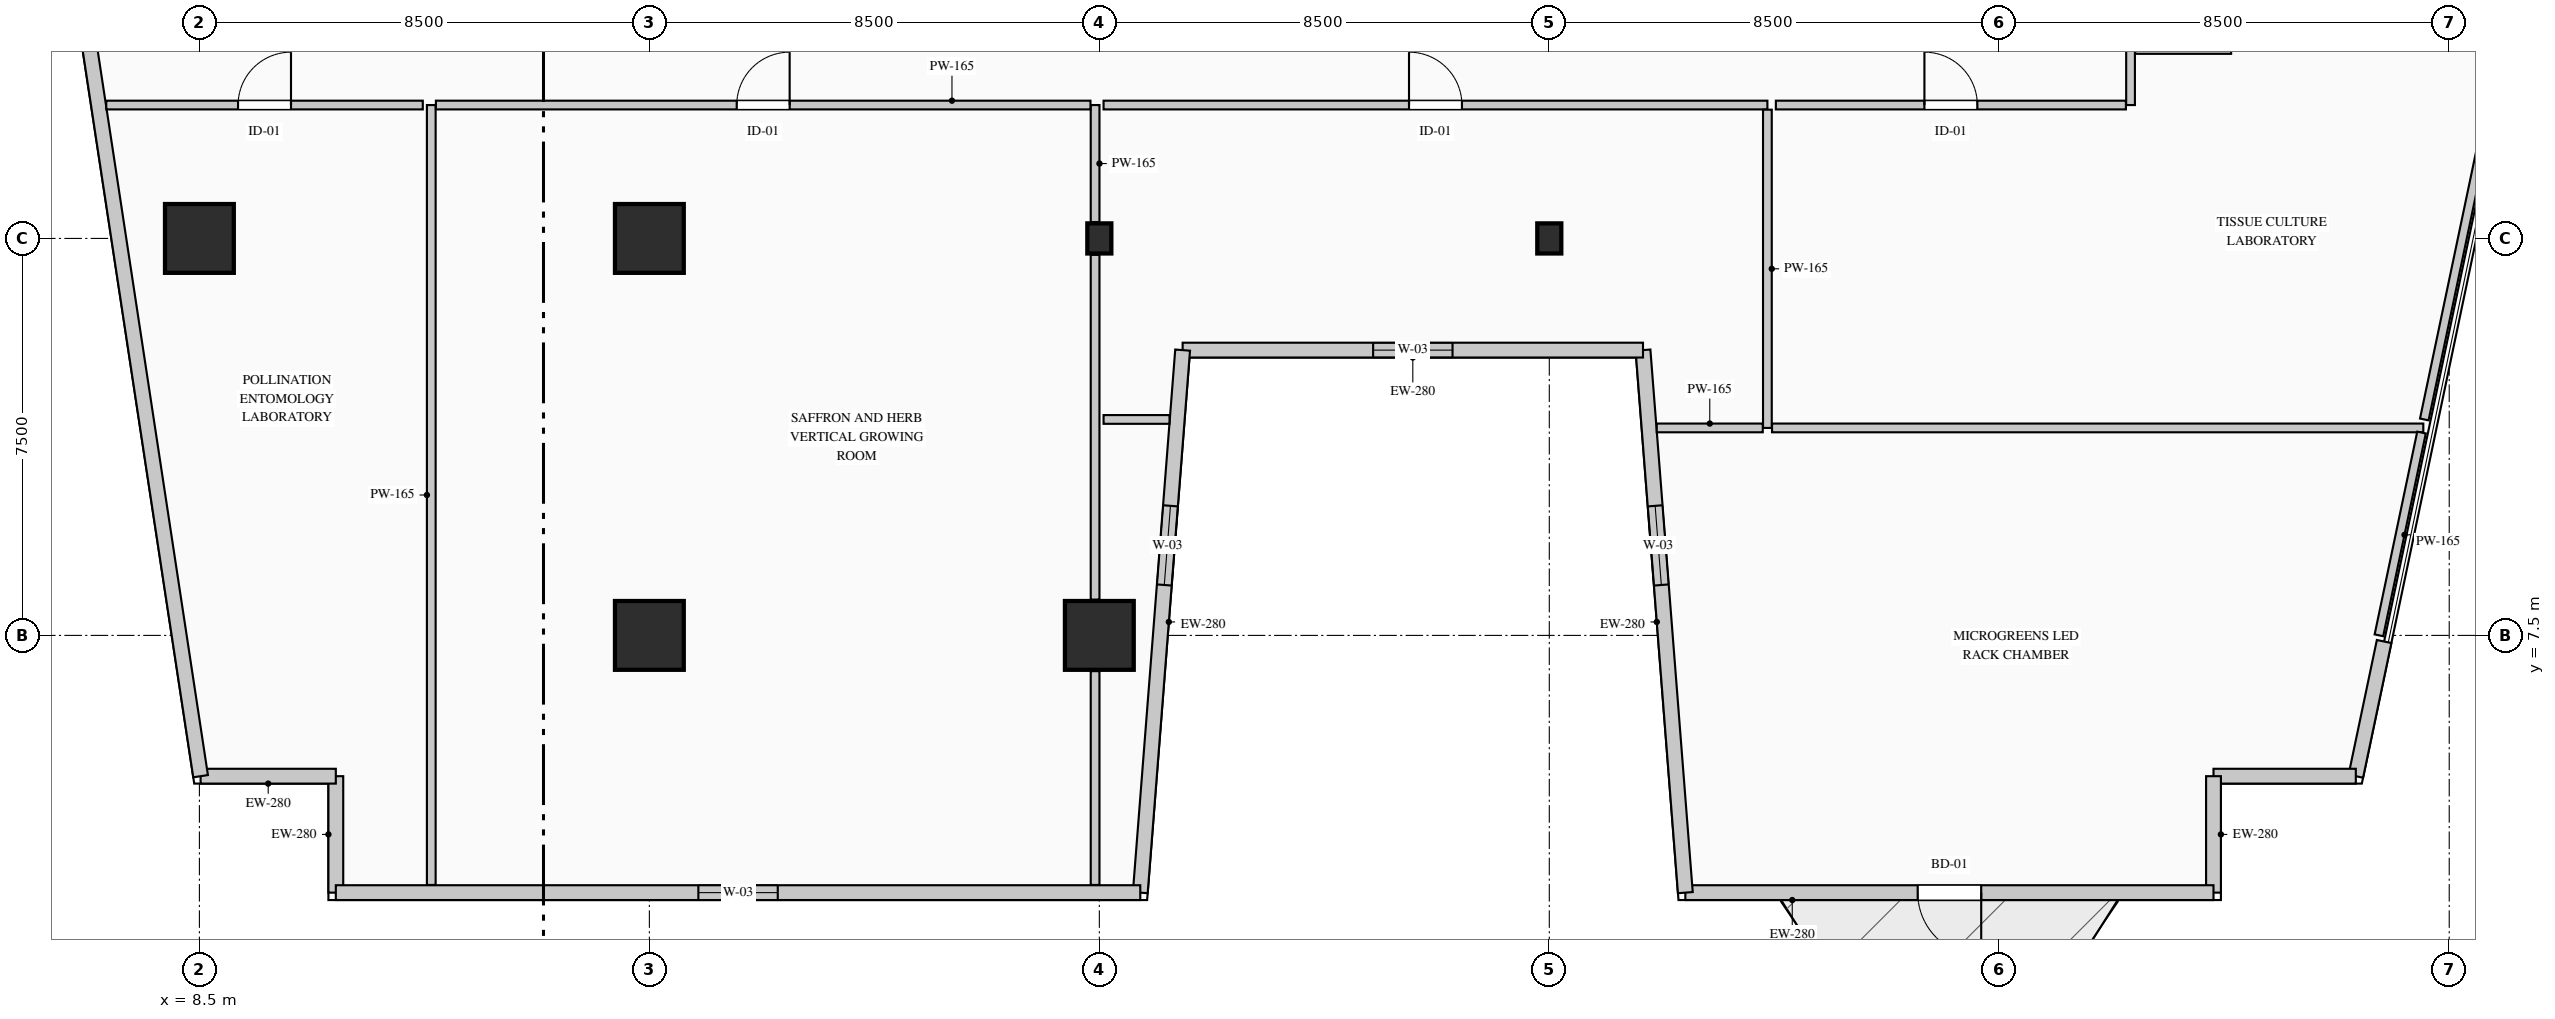
"""IFC4 building model, lengths in metres.
Left out: names, types, materials, properties, quantities, classifications, styles, units other than length and angle.
Written with IfcOpenShell. Run it as: python <this file> out.ifc"""

import sys

from ifc_helpers import new_model, si_unit, direction, frame, frame_2d, origin, origin_2d, place, context, subcontext, project, spatial, rectangle, i_section, extrude, element, fill, save


model = new_model("IFC4")
c1 = context("Model", 3, precision=1e-05, world=origin(), true_north=direction((0.0, 1.0)))
c2 = subcontext(c1, "Body", "Model", "MODEL_VIEW")
j1 = project(units=[si_unit("LENGTHUNIT", "METRE"), si_unit("PLANEANGLEUNIT", "RADIAN")], contexts=[c1])
p1 = place(None, origin())
s1 = spatial("IfcSite", under=j1, at=p1, CompositionType="ELEMENT")
p2 = place(p1, origin())
s2 = spatial("IfcBuilding", under=s1, at=p2, CompositionType="ELEMENT")
p3 = place(p2, frame((0.0, 0.0, 44.6)))
s3 = spatial("IfcBuildingStorey", under=s2, at=p3, CompositionType="ELEMENT", Elevation=44.6)
for number, where, z_axis, x_axis in (
    (1, (8.5, 15.0, 0.0), (0.0, 0.0, 1.0), (1.0, 0.0, 0.0)),
    (2, (17.0, 7.5, 0.0), (0.0, 0.0, 1.0), (1.0, 0.0, 0.0)),
    (3, (17.0, 15.0, 0.0), (0.0, 0.0, 1.0), (1.0, 0.0, 0.0)),
    (4, (25.5, 7.5, 0.0), (0.0, 0.0, 1.0), (1.0, 0.0, 0.0)),
):
    element("IfcColumn", number, at=place(p3, frame(where, z_axis=z_axis, x_axis=x_axis)), inside=s3, PredefinedType="COLUMN", context=c2, shape_type="SweptSolid", body=[
        extrude(rectangle(XDim=1.3, YDim=1.3, at=origin_2d()), origin(), (0.0, 0.0, 1.0), 4.4),
    ])
for number, where, z_axis, x_axis in (
    (5, (25.5, 15.0, 0.0), (0.0, 0.0, 1.0), (1.0, 0.0, 0.0)),
    (6, (34.0, 15.0, 0.0), (0.0, 0.0, 1.0), (1.0, 0.0, 0.0)),
):
    element("IfcColumn", number, at=place(p3, frame(where, z_axis=z_axis, x_axis=x_axis)), inside=s3, PredefinedType="COLUMN", context=c2, shape_type="SweptSolid", body=[
        extrude(i_section(OverallWidth=0.454, OverallDepth=0.569, WebThickness=0.078, FlangeThickness=0.08, FilletRadius=0.015, at=origin_2d()), origin(), (0.0, 0.0, 1.0), 4.4),
    ])
p4 = place(p3, frame((11.077, 2.64, 0.0), z_axis=(0.0, 0.0, 1.0), x_axis=(0.0, 1.0, 0.0)))
e7 = element("IfcWall", 7, at=p4, inside=s3, PredefinedType="STANDARD", context=c2, shape_type="SweptSolid", body=[
    extrude(rectangle(XDim=2.2, YDim=0.28, at=frame_2d((1.1, 0.0))), origin(), (0.0, 0.0, 1.0), 4.1),
])
p5 = place(p3, frame((11.077, 4.84, 0.0), z_axis=(0.0, 0.0, 1.0), x_axis=(-1.0, 0.0, 0.0)))
e8 = element("IfcWall", 8, at=p5, inside=s3, PredefinedType="STANDARD", context=c2, shape_type="SweptSolid", body=[
    extrude(rectangle(XDim=2.554, YDim=0.28, at=frame_2d((1.277, 0.0))), origin(), (0.0, 0.0, 1.0), 4.1),
])
p6 = place(p3, frame((8.523, 4.84, 0.0), z_axis=(0.0, 0.0, 1.0), x_axis=(-0.150394554312, 0.988626055712, 0.0)))
e9 = element("IfcWall", 9, at=p6, inside=s3, PredefinedType="STANDARD", context=c2, shape_type="SweptSolid", body=[
    extrude(rectangle(XDim=36.738, YDim=0.28, at=frame_2d((18.369, 0.0))), origin(), (0.0, 0.0, 1.0), 4.1),
])
p7 = place(p6, frame((22.762, 0.0, 0.9)))
e10 = element("IfcOpeningElement", 10, at=p7, cuts=e9, PredefinedType="OPENING", context=c2, shape_type="SweptSolid", body=[
    extrude(rectangle(XDim=1.5, YDim=1.8, at=frame_2d((0.75, 0.9))), frame((0.0, 0.15, 0.0), z_axis=(0.0, -1.0, 0.0), x_axis=(1.0, 0.0, 0.0)), (0.0, 0.0, 1.0), 0.3),
])
p8 = place(p3, frame((49.77, 7.385, 0.0), z_axis=(0.0, 0.0, 1.0), x_axis=(-0.205551409765, -0.978646319128, 0.0)))
e11 = element("IfcWall", 11, at=p8, inside=s3, PredefinedType="STANDARD", context=c2, shape_type="SweptSolid", body=[
    extrude(rectangle(XDim=2.6, YDim=0.28, at=frame_2d((1.3, 0.0))), origin(), (0.0, 0.0, 1.0), 4.1),
])
p9 = place(p3, frame((49.236, 4.84, 0.0), z_axis=(0.0, 0.0, 1.0), x_axis=(-1.0, 0.0, 0.0)))
e12 = element("IfcWall", 12, at=p9, inside=s3, PredefinedType="STANDARD", context=c2, shape_type="SweptSolid", body=[
    extrude(rectangle(XDim=2.688, YDim=0.28, at=frame_2d((1.344, 0.0))), origin(), (0.0, 0.0, 1.0), 4.1),
])
p10 = place(p3, frame((46.547, 4.84, 0.0), z_axis=(0.0, 0.0, 1.0), x_axis=(0.0, -1.0, 0.0)))
e13 = element("IfcWall", 13, at=p10, inside=s3, PredefinedType="STANDARD", context=c2, shape_type="SweptSolid", body=[
    extrude(rectangle(XDim=2.2, YDim=0.28, at=frame_2d((1.1, 0.0))), origin(), (0.0, 0.0, 1.0), 4.1),
])
p11 = place(p3, frame((46.547, 2.64, 0.0), z_axis=(0.0, 0.0, 1.0), x_axis=(-1.0, 0.0, 0.0)))
e14 = element("IfcWall", 14, at=p11, inside=s3, PredefinedType="STANDARD", context=c2, shape_type="SweptSolid", body=[
    extrude(rectangle(XDim=9.977, YDim=0.28, at=frame_2d((4.989, 0.0))), origin(), (0.0, 0.0, 1.0), 4.1),
])
p12 = place(p11, frame((4.388, 0.0, 0.0)))
e15 = element("IfcOpeningElement", 15, at=p12, cuts=e14, PredefinedType="OPENING", context=c2, shape_type="SweptSolid", body=[
    extrude(rectangle(XDim=1.2, YDim=2.2, at=frame_2d((0.6, 1.1))), frame((0.0, 0.15, 0.0), z_axis=(0.0, -1.0, 0.0), x_axis=(1.0, 0.0, 0.0)), (0.0, 0.0, 1.0), 0.3),
])
p13 = place(p3, frame((36.57, 2.64, 0.0), z_axis=(0.0, 0.0, 1.0), x_axis=(-0.077816860153, 0.996967670627, 0.0)))
e16 = element("IfcWall", 16, at=p13, inside=s3, PredefinedType="STANDARD", context=c2, shape_type="SweptSolid", body=[
    extrude(rectangle(XDim=10.281, YDim=0.28, at=frame_2d((5.141, 0.0))), origin(), (0.0, 0.0, 1.0), 4.1),
])
p14 = place(p13, frame((5.83, 0.0, 0.9)))
e17 = element("IfcOpeningElement", 17, at=p14, cuts=e16, PredefinedType="OPENING", context=c2, shape_type="SweptSolid", body=[
    extrude(rectangle(XDim=1.5, YDim=1.8, at=frame_2d((0.75, 0.9))), frame((0.0, 0.15, 0.0), z_axis=(0.0, -1.0, 0.0), x_axis=(1.0, 0.0, 0.0)), (0.0, 0.0, 1.0), 0.3),
])
p15 = place(p3, frame((35.77, 12.89, 0.0), z_axis=(0.0, 0.0, 1.0), x_axis=(-1.0, 0.0, 0.0)))
e18 = element("IfcWall", 18, at=p15, inside=s3, PredefinedType="STANDARD", context=c2, shape_type="SweptSolid", body=[
    extrude(rectangle(XDim=8.697, YDim=0.28, at=frame_2d((4.348, 0.0))), origin(), (0.0, 0.0, 1.0), 4.1),
])
p16 = place(p15, frame((3.598, 0.0, 0.9)))
e19 = element("IfcOpeningElement", 19, at=p16, cuts=e18, PredefinedType="OPENING", context=c2, shape_type="SweptSolid", body=[
    extrude(rectangle(XDim=1.5, YDim=1.8, at=frame_2d((0.75, 0.9))), frame((0.0, 0.15, 0.0), z_axis=(0.0, -1.0, 0.0), x_axis=(1.0, 0.0, 0.0)), (0.0, 0.0, 1.0), 0.3),
])
p17 = place(p3, frame((27.073, 12.89, 0.0), z_axis=(0.0, 0.0, 1.0), x_axis=(-0.077816860153, -0.996967670627, 0.0)))
e20 = element("IfcWall", 20, at=p17, inside=s3, PredefinedType="STANDARD", context=c2, shape_type="SweptSolid", body=[
    extrude(rectangle(XDim=10.281, YDim=0.28, at=frame_2d((5.141, 0.0))), origin(), (0.0, 0.0, 1.0), 4.1),
])
p18 = place(p17, frame((2.951, 0.0, 0.9)))
e21 = element("IfcOpeningElement", 21, at=p18, cuts=e20, PredefinedType="OPENING", context=c2, shape_type="SweptSolid", body=[
    extrude(rectangle(XDim=1.5, YDim=1.8, at=frame_2d((0.75, 0.9))), frame((0.0, 0.15, 0.0), z_axis=(0.0, -1.0, 0.0), x_axis=(1.0, 0.0, 0.0)), (0.0, 0.0, 1.0), 0.3),
])
p19 = place(p3, frame((26.273, 2.64, 0.0), z_axis=(0.0, 0.0, 1.0), x_axis=(-1.0, 0.0, 0.0)))
e22 = element("IfcWall", 22, at=p19, inside=s3, PredefinedType="STANDARD", context=c2, shape_type="SweptSolid", body=[
    extrude(rectangle(XDim=15.197, YDim=0.28, at=frame_2d((7.598, 0.0))), origin(), (0.0, 0.0, 1.0), 4.1),
])
p20 = place(p19, frame((6.848, 0.0, 0.9)))
e23 = element("IfcOpeningElement", 23, at=p20, cuts=e22, PredefinedType="OPENING", context=c2, shape_type="SweptSolid", body=[
    extrude(rectangle(XDim=1.5, YDim=1.8, at=frame_2d((0.75, 0.9))), frame((0.0, 0.15, 0.0), z_axis=(0.0, -1.0, 0.0), x_axis=(1.0, 0.0, 0.0)), (0.0, 0.0, 1.0), 0.3),
])
p21 = place(p3, frame((25.42, 17.52, 0.0), z_axis=(0.0, 0.0, 1.0), x_axis=(0.0, -1.0, 0.0)))
e24 = element("IfcWall", 24, at=p21, inside=s3, PredefinedType="PARTITIONING", context=c2, shape_type="SweptSolid", body=[
    extrude(rectangle(XDim=2.21, YDim=0.165, at=frame_2d((1.105, 0.0))), origin(), (0.0, 0.0, 1.0), 3.285),
])
p22 = place(p3, frame((25.42, 14.69, 0.0), z_axis=(0.0, 0.0, 1.0), x_axis=(0.0, -1.0, 0.0)))
e25 = element("IfcWall", 25, at=p22, inside=s3, PredefinedType="PARTITIONING", context=c2, shape_type="SweptSolid", body=[
    extrude(rectangle(XDim=6.515, YDim=0.165, at=frame_2d((3.258, 0.0))), origin(), (0.0, 0.0, 1.0), 3.385),
])
p23 = place(p3, frame((25.42, 6.825, 0.0), z_axis=(0.0, 0.0, 1.0), x_axis=(0.0, -1.0, 0.0)))
e26 = element("IfcWall", 26, at=p23, inside=s3, PredefinedType="PARTITIONING", context=c2, shape_type="SweptSolid", body=[
    extrude(rectangle(XDim=4.04, YDim=0.165, at=frame_2d((2.02, 0.0))), origin(), (0.0, 0.0, 1.0), 4.1),
])
p24 = place(p3, frame((12.88, 2.785, 0.0), z_axis=(0.0, 0.0, 1.0), x_axis=(0.0, 1.0, 0.0)))
e27 = element("IfcWall", 27, at=p24, inside=s3, PredefinedType="PARTITIONING", context=c2, shape_type="SweptSolid", body=[
    extrude(rectangle(XDim=14.735, YDim=0.165, at=frame_2d((7.368, 0.0))), origin(), (0.0, 0.0, 1.0), 4.1),
])
p25 = place(p3, frame((12.968, 17.52, 0.0), z_axis=(0.0, 0.0, 1.0), x_axis=(1.0, 0.0, 0.0)))
e28 = element("IfcWall", 28, at=p25, inside=s3, PredefinedType="PARTITIONING", context=c2, shape_type="SweptSolid", body=[
    extrude(rectangle(XDim=12.365, YDim=0.165, at=frame_2d((6.183, 0.0))), origin(), (0.0, 0.0, 1.0), 4.1),
])
p26 = place(p25, frame((5.683, 0.0, 0.0)))
e29 = element("IfcOpeningElement", 29, at=p26, cuts=e28, PredefinedType="OPENING", context=c2, shape_type="SweptSolid", body=[
    extrude(rectangle(XDim=1.0, YDim=2.15, at=frame_2d((0.5, 1.075))), frame((0.0, 0.093, 0.0), z_axis=(0.0, -1.0, 0.0), x_axis=(1.0, 0.0, 0.0)), (0.0, 0.0, 1.0), 0.185),
])
p27 = place(p3, frame((26.826, 11.58, 0.0), z_axis=(0.0, 0.0, 1.0), x_axis=(-1.0, 0.0, 0.0)))
e30 = element("IfcWall", 30, at=p27, inside=s3, PredefinedType="PARTITIONING", context=c2, shape_type="SweptSolid", body=[
    extrude(rectangle(XDim=1.246, YDim=0.165, at=frame_2d((0.623, 0.0))), origin(), (0.0, 0.0, 1.0), 4.1),
])
p28 = place(p3, frame((25.58, 17.52, 0.0), z_axis=(0.0, 0.0, 1.0), x_axis=(1.0, 0.0, 0.0)))
e31 = element("IfcWall", 31, at=p28, inside=s3, PredefinedType="PARTITIONING", context=c2, shape_type="SweptSolid", body=[
    extrude(rectangle(XDim=12.54, YDim=0.165, at=frame_2d((6.27, 0.0))), origin(), (0.0, 0.0, 1.0), 3.785),
])
p29 = place(p28, frame((5.77, 0.0, 0.0)))
e32 = element("IfcOpeningElement", 32, at=p29, cuts=e31, PredefinedType="OPENING", context=c2, shape_type="SweptSolid", body=[
    extrude(rectangle(XDim=1.0, YDim=2.15, at=frame_2d((0.5, 1.075))), frame((0.0, 0.093, 0.0), z_axis=(0.0, -1.0, 0.0), x_axis=(1.0, 0.0, 0.0)), (0.0, 0.0, 1.0), 0.185),
])
p30 = place(p3, frame((38.12, 17.433, 0.0), z_axis=(0.0, 0.0, 1.0), x_axis=(0.0, -1.0, 0.0)))
e33 = element("IfcWall", 33, at=p30, inside=s3, PredefinedType="PARTITIONING", context=c2, shape_type="SweptSolid", body=[
    extrude(rectangle(XDim=6.013, YDim=0.165, at=frame_2d((3.006, 0.0))), origin(), (0.0, 0.0, 1.0), 4.1),
])
p31 = place(p3, frame((36.03, 11.42, 0.0), z_axis=(0.0, 0.0, 1.0), x_axis=(1.0, 0.0, 0.0)))
e34 = element("IfcWall", 34, at=p31, inside=s3, PredefinedType="PARTITIONING", context=c2, shape_type="SweptSolid", body=[
    extrude(rectangle(XDim=2.002, YDim=0.165, at=frame_2d((1.001, 0.0))), origin(), (0.0, 0.0, 1.0), 4.1),
])
p32 = place(p3, frame((38.208, 11.42, 0.0), z_axis=(0.0, 0.0, 1.0), x_axis=(1.0, 0.0, 0.0)))
e35 = element("IfcWall", 35, at=p32, inside=s3, PredefinedType="PARTITIONING", context=c2, shape_type="SweptSolid", body=[
    extrude(rectangle(XDim=12.303, YDim=0.165, at=frame_2d((6.151, 0.0))), origin(), (0.0, 0.0, 1.0), 4.1),
])
p33 = place(p3, frame((50.477, 11.333, 0.0), z_axis=(0.0, 0.0, 1.0), x_axis=(-0.205570398428, -0.978642330624, 0.0)))
e36 = element("IfcWall", 36, at=p33, inside=s3, PredefinedType="PARTITIONING", context=c2, shape_type="SweptSolid", body=[
    extrude(rectangle(XDim=3.914, YDim=0.165, at=frame_2d((1.957, 0.0))), origin(), (0.0, 0.0, 1.0), 4.1),
])
p34 = place(p3, frame((6.74, 17.52, 0.0), z_axis=(0.0, 0.0, 1.0), x_axis=(1.0, 0.0, 0.0)))
e37 = element("IfcWall", 37, at=p34, inside=s3, PredefinedType="PARTITIONING", context=c2, shape_type="SweptSolid", body=[
    extrude(rectangle(XDim=5.979, YDim=0.165, at=frame_2d((2.99, 0.0))), origin(), (0.0, 0.0, 1.0), 4.1),
])
p35 = place(p34, frame((2.49, 0.0, 0.0)))
e38 = element("IfcOpeningElement", 38, at=p35, cuts=e37, PredefinedType="OPENING", context=c2, shape_type="SweptSolid", body=[
    extrude(rectangle(XDim=1.0, YDim=2.15, at=frame_2d((0.5, 1.075))), frame((0.0, 0.093, 0.0), z_axis=(0.0, -1.0, 0.0), x_axis=(1.0, 0.0, 0.0)), (0.0, 0.0, 1.0), 0.185),
])
p36 = place(p3, frame((44.98, 17.52, 0.0), z_axis=(0.0, 0.0, 1.0), x_axis=(0.0, 1.0, 0.0)))
e39 = element("IfcWall", 39, at=p36, inside=s3, PredefinedType="PARTITIONING", context=c2, shape_type="SweptSolid", body=[
    extrude(rectangle(XDim=1.05, YDim=0.165, at=frame_2d((0.525, 0.0))), origin(), (0.0, 0.0, 1.0), 4.1),
])
p37 = place(p3, frame((45.067, 18.57, 0.0), z_axis=(0.0, 0.0, 1.0), x_axis=(1.0, 0.0, 0.0)))
e40 = element("IfcWall", 40, at=p37, inside=s3, PredefinedType="PARTITIONING", context=c2, shape_type="SweptSolid", body=[
    extrude(rectangle(XDim=1.812, YDim=0.165, at=frame_2d((0.906, 0.0))), origin(), (0.0, 0.0, 1.0), 4.1),
])
p38 = place(p3, frame((52.77, 22.248, 0.0), z_axis=(0.0, 0.0, 1.0), x_axis=(-0.205565714744, -0.978643314452, 0.0)))
e41 = element("IfcWall", 41, at=p38, inside=s3, PredefinedType="PARTITIONING", context=c2, shape_type="SweptSolid", body=[
    extrude(rectangle(XDim=10.9, YDim=0.165, at=frame_2d((5.45, 0.0))), origin(), (0.0, 0.0, 1.0), 4.1),
])
p39 = place(p3, frame((38.28, 17.52, 0.0), z_axis=(0.0, 0.0, 1.0), x_axis=(1.0, 0.0, 0.0)))
e42 = element("IfcWall", 42, at=p39, inside=s3, PredefinedType="PARTITIONING", context=c2, shape_type="SweptSolid", body=[
    extrude(rectangle(XDim=6.613, YDim=0.165, at=frame_2d((3.306, 0.0))), origin(), (0.0, 0.0, 1.0), 4.1),
])
p40 = place(p39, frame((2.806, 0.0, 0.0)))
e43 = element("IfcOpeningElement", 43, at=p40, cuts=e42, PredefinedType="OPENING", context=c2, shape_type="SweptSolid", body=[
    extrude(rectangle(XDim=1.0, YDim=2.15, at=frame_2d((0.5, 1.075))), frame((0.0, 0.093, 0.0), z_axis=(0.0, -1.0, 0.0), x_axis=(1.0, 0.0, 0.0)), (0.0, 0.0, 1.0), 0.185),
])
p41 = place(p12, origin())
e44 = element("IfcDoor", 44, at=p41, inside=s3, OperationType="SINGLE_SWING_LEFT", PredefinedType="DOOR", context=c2, shape_type="SweptSolid", body=[
    extrude(rectangle(XDim=1.2, YDim=2.2, at=frame_2d((0.6, 1.1))), frame((0.0, 0.025, 0.0), z_axis=(0.0, -1.0, 0.0), x_axis=(1.0, 0.0, 0.0)), (0.0, 0.0, 1.0), 0.05),
])
fill(e15, e44)
p42 = place(p14, origin())
e45 = element("IfcWindow", 45, at=p42, inside=s3, PartitioningType="SINGLE_PANEL", PredefinedType="WINDOW", context=c2, shape_type="SweptSolid", body=[
    extrude(rectangle(XDim=1.5, YDim=1.8, at=frame_2d((0.75, 0.9))), frame((0.0, 0.03, 0.0), z_axis=(0.0, -1.0, 0.0), x_axis=(1.0, 0.0, 0.0)), (0.0, 0.0, 1.0), 0.06),
])
fill(e17, e45)
p43 = place(p16, origin())
e46 = element("IfcWindow", 46, at=p43, inside=s3, PartitioningType="SINGLE_PANEL", PredefinedType="WINDOW", context=c2, shape_type="SweptSolid", body=[
    extrude(rectangle(XDim=1.5, YDim=1.8, at=frame_2d((0.75, 0.9))), frame((0.0, 0.03, 0.0), z_axis=(0.0, -1.0, 0.0), x_axis=(1.0, 0.0, 0.0)), (0.0, 0.0, 1.0), 0.06),
])
fill(e19, e46)
p44 = place(p18, origin())
e47 = element("IfcWindow", 47, at=p44, inside=s3, PartitioningType="SINGLE_PANEL", PredefinedType="WINDOW", context=c2, shape_type="SweptSolid", body=[
    extrude(rectangle(XDim=1.5, YDim=1.8, at=frame_2d((0.75, 0.9))), frame((0.0, 0.03, 0.0), z_axis=(0.0, -1.0, 0.0), x_axis=(1.0, 0.0, 0.0)), (0.0, 0.0, 1.0), 0.06),
])
fill(e21, e47)
p45 = place(p20, origin())
e48 = element("IfcWindow", 48, at=p45, inside=s3, PartitioningType="SINGLE_PANEL", PredefinedType="WINDOW", context=c2, shape_type="SweptSolid", body=[
    extrude(rectangle(XDim=1.5, YDim=1.8, at=frame_2d((0.75, 0.9))), frame((0.0, 0.03, 0.0), z_axis=(0.0, -1.0, 0.0), x_axis=(1.0, 0.0, 0.0)), (0.0, 0.0, 1.0), 0.06),
])
fill(e23, e48)
p46 = place(p26, origin())
e49 = element("IfcDoor", 49, at=p46, inside=s3, OperationType="SINGLE_SWING_RIGHT", PredefinedType="DOOR", context=c2, shape_type="SweptSolid", body=[
    extrude(rectangle(XDim=1.0, YDim=2.15, at=frame_2d((0.5, 1.075))), frame((0.0, 0.025, 0.0), z_axis=(0.0, -1.0, 0.0), x_axis=(1.0, 0.0, 0.0)), (0.0, 0.0, 1.0), 0.05),
])
fill(e29, e49)
p47 = place(p29, origin())
e50 = element("IfcDoor", 50, at=p47, inside=s3, OperationType="SINGLE_SWING_LEFT", PredefinedType="DOOR", context=c2, shape_type="SweptSolid", body=[
    extrude(rectangle(XDim=1.0, YDim=2.15, at=frame_2d((0.5, 1.075))), frame((0.0, 0.025, 0.0), z_axis=(0.0, -1.0, 0.0), x_axis=(1.0, 0.0, 0.0)), (0.0, 0.0, 1.0), 0.05),
])
fill(e32, e50)
p48 = place(p35, origin())
e51 = element("IfcDoor", 51, at=p48, inside=s3, OperationType="SINGLE_SWING_RIGHT", PredefinedType="DOOR", context=c2, shape_type="SweptSolid", body=[
    extrude(rectangle(XDim=1.0, YDim=2.15, at=frame_2d((0.5, 1.075))), frame((0.0, 0.025, 0.0), z_axis=(0.0, -1.0, 0.0), x_axis=(1.0, 0.0, 0.0)), (0.0, 0.0, 1.0), 0.05),
])
fill(e38, e51)
p49 = place(p40, origin())
e52 = element("IfcDoor", 52, at=p49, inside=s3, OperationType="SINGLE_SWING_LEFT", PredefinedType="DOOR", context=c2, shape_type="SweptSolid", body=[
    extrude(rectangle(XDim=1.0, YDim=2.15, at=frame_2d((0.5, 1.075))), frame((0.0, 0.025, 0.0), z_axis=(0.0, -1.0, 0.0), x_axis=(1.0, 0.0, 0.0)), (0.0, 0.0, 1.0), 0.05),
])
fill(e43, e52)
save(model, sys.argv[1])
